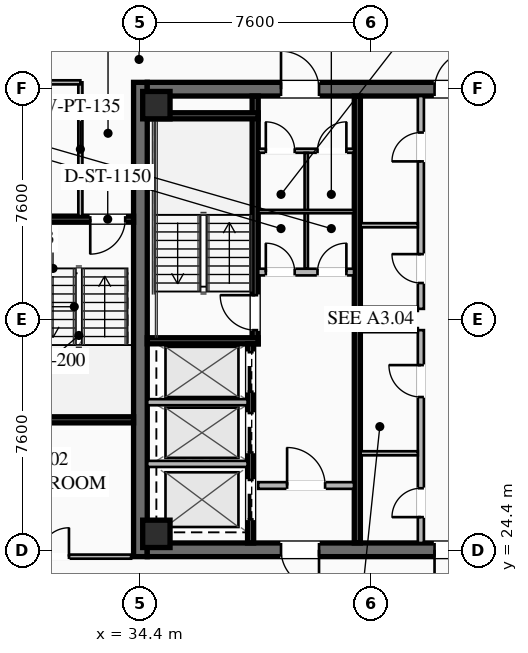
"""IFC4 building model, lengths in metres.
Left out: names, types, materials, properties, quantities, classifications, styles, units other than length and angle.
Written with IfcOpenShell. Run it as: python <this file> out.ifc"""

import sys

from ifc_helpers import new_model, si_unit, direction, frame, frame_2d, origin, origin_2d, place, context, subcontext, project, spatial, rectangle, hollow_rectangle, extrude, element, fill, save


model = new_model("IFC4")
c1 = context("Model", 3, precision=1e-05, world=origin(), true_north=direction((0.0, 1.0)))
c2 = subcontext(c1, "Body", "Model", "MODEL_VIEW")
j1 = project(units=[si_unit("LENGTHUNIT", "METRE"), si_unit("PLANEANGLEUNIT", "RADIAN")], contexts=[c1])
p1 = place(None, origin())
s1 = spatial("IfcSite", under=j1, at=p1, CompositionType="ELEMENT")
p2 = place(p1, origin())
s2 = spatial("IfcBuilding", under=s1, at=p2, CompositionType="ELEMENT")
p3 = place(p2, frame((0.0, 0.0, 204.2)))
s3 = spatial("IfcBuildingStorey", under=s2, at=p3, CompositionType="ELEMENT", Elevation=204.2)
p4 = place(p3, frame((34.425, 24.2, 0.0), z_axis=(0.0, 0.0, 1.0), x_axis=(0.0, 1.0, 0.0)))
e1 = element("IfcWall", 1, at=p4, inside=s3, PredefinedType="SHEAR", context=c2, shape_type="SweptSolid", body=[
    extrude(rectangle(XDim=15.6, YDim=0.45, at=frame_2d((7.8, 0.0))), origin(), (0.0, 0.0, 1.0), 3.55),
])
p5 = place(p3, frame((49.35, 24.425, 0.0), z_axis=(0.0, 0.0, 1.0), x_axis=(-1.0, 0.0, 0.0)))
e2 = element("IfcWall", 2, at=p5, inside=s3, PredefinedType="SHEAR", context=c2, shape_type="SweptSolid", body=[
    extrude(rectangle(XDim=14.7, YDim=0.45, at=frame_2d((7.35, 0.0))), origin(), (0.0, 0.0, 1.0), 3.55),
])
p6 = place(p5, frame((9.05, 0.0, 0.0)))
e3 = element("IfcOpeningElement", 3, at=p6, cuts=e2, PredefinedType="OPENING", context=c2, shape_type="SweptSolid", body=[
    extrude(rectangle(XDim=1.25, YDim=2.25, at=frame_2d((0.625, 1.125))), frame((0.0, 0.235, 0.0), z_axis=(0.0, -1.0, 0.0), x_axis=(1.0, 0.0, 0.0)), (0.0, 0.0, 1.0), 0.47),
])
p7 = place(p5, frame((4.0, 0.0, 0.0)))
e4 = element("IfcOpeningElement", 4, at=p7, cuts=e2, PredefinedType="OPENING", context=c2, shape_type="SweptSolid", body=[
    extrude(rectangle(XDim=1.25, YDim=2.25, at=frame_2d((0.625, 1.125))), frame((0.0, 0.235, 0.0), z_axis=(0.0, -1.0, 0.0), x_axis=(1.0, 0.0, 0.0)), (0.0, 0.0, 1.0), 0.47),
])
p8 = place(p3, frame((34.65, 39.575, 0.0), z_axis=(0.0, 0.0, 1.0), x_axis=(1.0, 0.0, 0.0)))
e5 = element("IfcWall", 5, at=p8, inside=s3, PredefinedType="SHEAR", context=c2, shape_type="SweptSolid", body=[
    extrude(rectangle(XDim=14.7, YDim=0.45, at=frame_2d((7.35, 0.0))), origin(), (0.0, 0.0, 1.0), 3.55),
])
p9 = place(p8, frame((4.4, 0.0, 0.0)))
e6 = element("IfcOpeningElement", 6, at=p9, cuts=e5, PredefinedType="OPENING", context=c2, shape_type="SweptSolid", body=[
    extrude(rectangle(XDim=1.25, YDim=2.25, at=frame_2d((0.625, 1.125))), frame((0.0, 0.235, 0.0), z_axis=(0.0, -1.0, 0.0), x_axis=(1.0, 0.0, 0.0)), (0.0, 0.0, 1.0), 0.47),
])
p10 = place(p8, frame((9.45, 0.0, 0.0)))
e7 = element("IfcOpeningElement", 7, at=p10, cuts=e5, PredefinedType="OPENING", context=c2, shape_type="SweptSolid", body=[
    extrude(rectangle(XDim=1.25, YDim=2.25, at=frame_2d((0.625, 1.125))), frame((0.0, 0.235, 0.0), z_axis=(0.0, -1.0, 0.0), x_axis=(1.0, 0.0, 0.0)), (0.0, 0.0, 1.0), 0.47),
])
for number, where, z_axis, x_axis in (
    (8, (34.95, 24.95, 0.0), (0.0, 0.0, 1.0), (1.0, 0.0, 0.0)),
    (9, (34.95, 39.05, 0.0), (0.0, 0.0, 1.0), (1.0, 0.0, 0.0)),
):
    element("IfcColumn", number, at=place(p3, frame(where, z_axis=z_axis, x_axis=x_axis)), inside=s3, PredefinedType="COLUMN", context=c2, shape_type="SweptSolid", body=[
        extrude(hollow_rectangle(XDim=0.9, YDim=0.9, WallThickness=0.04, at=origin_2d()), origin(), (0.0, 0.0, 1.0), 3.37),
    ])
p11 = place(p3, frame((38.2, 31.2, 0.0), z_axis=(0.0, 0.0, 1.0), x_axis=(0.0, 1.0, 0.0)))
e10 = element("IfcWall", 10, at=p11, inside=s3, PredefinedType="SHEAR", context=c2, shape_type="SweptSolid", body=[
    extrude(rectangle(XDim=8.15, YDim=0.2, at=frame_2d((4.075, 0.0))), origin(), (0.0, 0.0, 1.0), 3.37),
])
p12 = place(p11, frame((0.45, 0.0, 0.0)))
e11 = element("IfcOpeningElement", 11, at=p12, cuts=e10, PredefinedType="OPENING", context=c2, shape_type="SweptSolid", body=[
    extrude(rectangle(XDim=1.15, YDim=2.2, at=frame_2d((0.575, 1.1))), frame((0.0, 0.11, 0.0), z_axis=(0.0, -1.0, 0.0), x_axis=(1.0, 0.0, 0.0)), (0.0, 0.0, 1.0), 0.22),
])
for number, where, z_axis, x_axis in (
    (12, (34.65, 31.3, 0.0), (0.0, 0.0, 1.0), (1.0, 0.0, 0.0)),
    (13, (34.65, 38.7, 0.0), (0.0, 0.0, 1.0), (1.0, 0.0, 0.0)),
):
    element("IfcWall", number, at=place(p3, frame(where, z_axis=z_axis, x_axis=x_axis)), inside=s3, PredefinedType="SHEAR", context=c2, shape_type="SweptSolid", body=[
        extrude(rectangle(XDim=3.65, YDim=0.2, at=frame_2d((1.825, 0.0))), origin(), (0.0, 0.0, 1.0), 3.37),
    ])
p13 = place(p3, frame((41.56, 24.65, 0.0), z_axis=(0.0, 0.0, 1.0), x_axis=(0.0, 1.0, 0.0)))
e14 = element("IfcWall", 14, at=p13, inside=s3, PredefinedType="SHEAR", context=c2, shape_type="SweptSolid", body=[
    extrude(rectangle(XDim=14.7, YDim=0.2, at=frame_2d((7.35, 0.0))), origin(), (0.0, 0.0, 1.0), 3.37),
])
p14 = place(p3, frame((38.3, 33.56, 0.0), z_axis=(0.0, 0.0, 1.0), x_axis=(1.0, 0.0, 0.0)))
e15 = element("IfcWall", 15, at=p14, inside=s3, PredefinedType="SOLIDWALL", context=c2, shape_type="SweptSolid", body=[
    extrude(rectangle(XDim=3.15, YDim=0.22, at=frame_2d((1.575, 0.0))), origin(), (0.0, 0.0, 1.0), 2.723),
])
p15 = place(p14, frame((0.25, 0.0, 0.0)))
e16 = element("IfcOpeningElement", 16, at=p15, cuts=e15, PredefinedType="OPENING", context=c2, shape_type="SweptSolid", body=[
    extrude(rectangle(XDim=0.95, YDim=2.05, at=frame_2d((0.475, 1.025))), frame((0.0, 0.12, 0.0), z_axis=(0.0, -1.0, 0.0), x_axis=(1.0, 0.0, 0.0)), (0.0, 0.0, 1.0), 0.24),
])
p16 = place(p14, frame((1.95, 0.0, 0.0)))
e17 = element("IfcOpeningElement", 17, at=p16, cuts=e15, PredefinedType="OPENING", context=c2, shape_type="SweptSolid", body=[
    extrude(rectangle(XDim=0.95, YDim=2.05, at=frame_2d((0.475, 1.025))), frame((0.0, 0.12, 0.0), z_axis=(0.0, -1.0, 0.0), x_axis=(1.0, 0.0, 0.0)), (0.0, 0.0, 1.0), 0.24),
])
p17 = place(p3, frame((38.3, 26.54, 0.0), z_axis=(0.0, 0.0, 1.0), x_axis=(1.0, 0.0, 0.0)))
e18 = element("IfcWall", 18, at=p17, inside=s3, PredefinedType="SOLIDWALL", context=c2, shape_type="SweptSolid", body=[
    extrude(rectangle(XDim=3.15, YDim=0.22, at=frame_2d((1.575, 0.0))), origin(), (0.0, 0.0, 1.0), 2.723),
])
p18 = place(p17, frame((0.95, 0.0, 0.0)))
e19 = element("IfcOpeningElement", 19, at=p18, cuts=e18, PredefinedType="OPENING", context=c2, shape_type="SweptSolid", body=[
    extrude(rectangle(XDim=1.25, YDim=2.25, at=frame_2d((0.625, 1.125))), frame((0.0, 0.12, 0.0), z_axis=(0.0, -1.0, 0.0), x_axis=(1.0, 0.0, 0.0)), (0.0, 0.0, 1.0), 0.24),
])
p19 = place(p3, frame((38.05, 24.65, 0.0), z_axis=(0.0, 0.0, 1.0), x_axis=(0.0, 1.0, 0.0)))
e20 = element("IfcWall", 20, at=p19, inside=s3, PredefinedType="SHEAR", context=c2, shape_type="SweptSolid", body=[
    extrude(rectangle(XDim=6.55, YDim=0.2, at=frame_2d((3.275, 0.0))), origin(), (0.0, 0.0, 1.0), 3.37),
])
p20 = place(p19, frame((4.975, 0.0, 0.0)))
e21 = element("IfcOpeningElement", 21, at=p20, cuts=e20, PredefinedType="OPENING", context=c2, shape_type="SweptSolid", body=[
    extrude(rectangle(XDim=1.3, YDim=2.25, at=frame_2d((0.65, 1.125))), frame((0.0, 0.11, 0.0), z_axis=(0.0, -1.0, 0.0), x_axis=(1.0, 0.0, 0.0)), (0.0, 0.0, 1.0), 0.22),
])
p21 = place(p19, frame((2.975, 0.0, 0.0)))
e22 = element("IfcOpeningElement", 22, at=p21, cuts=e20, PredefinedType="OPENING", context=c2, shape_type="SweptSolid", body=[
    extrude(rectangle(XDim=1.3, YDim=2.25, at=frame_2d((0.65, 1.125))), frame((0.0, 0.11, 0.0), z_axis=(0.0, -1.0, 0.0), x_axis=(1.0, 0.0, 0.0)), (0.0, 0.0, 1.0), 0.22),
])
p22 = place(p19, frame((0.775, 0.0, 0.0)))
e23 = element("IfcOpeningElement", 23, at=p22, cuts=e20, PredefinedType="OPENING", context=c2, shape_type="SweptSolid", body=[
    extrude(rectangle(XDim=1.3, YDim=2.25, at=frame_2d((0.65, 1.125))), frame((0.0, 0.11, 0.0), z_axis=(0.0, -1.0, 0.0), x_axis=(1.0, 0.0, 0.0)), (0.0, 0.0, 1.0), 0.22),
])
for number, where, z_axis, x_axis in (
    (24, (34.65, 27.25, 0.0), (0.0, 0.0, 1.0), (1.0, 0.0, 0.0)),
    (25, (34.65, 29.28, 0.0), (0.0, 0.0, 1.0), (1.0, 0.0, 0.0)),
):
    element("IfcWall", number, at=place(p3, frame(where, z_axis=z_axis, x_axis=x_axis)), inside=s3, PredefinedType="SOLIDWALL", context=c2, shape_type="SweptSolid", body=[
        extrude(rectangle(XDim=3.3, YDim=0.2, at=frame_2d((1.65, 0.0))), origin(), (0.0, 0.0, 1.0), 3.37),
    ])
p23 = place(p3, frame((38.3, 37.55, 0.0), z_axis=(0.0, 0.0, 1.0), x_axis=(1.0, 0.0, 0.0)))
e26 = element("IfcWall", 26, at=p23, inside=s3, PredefinedType="PARTITIONING", context=c2, shape_type="SweptSolid", body=[
    extrude(rectangle(XDim=3.15, YDim=0.135, at=frame_2d((1.575, 0.0))), origin(), (0.0, 0.0, 1.0), 2.723),
])
p24 = place(p23, frame((0.25, 0.0, 0.0)))
e27 = element("IfcOpeningElement", 27, at=p24, cuts=e26, PredefinedType="OPENING", context=c2, shape_type="SweptSolid", body=[
    extrude(rectangle(XDim=0.95, YDim=2.05, at=frame_2d((0.475, 1.025))), frame((0.0, 0.077, 0.0), z_axis=(0.0, -1.0, 0.0), x_axis=(1.0, 0.0, 0.0)), (0.0, 0.0, 1.0), 0.155),
])
p25 = place(p23, frame((1.95, 0.0, 0.0)))
e28 = element("IfcOpeningElement", 28, at=p25, cuts=e26, PredefinedType="OPENING", context=c2, shape_type="SweptSolid", body=[
    extrude(rectangle(XDim=0.95, YDim=2.05, at=frame_2d((0.475, 1.025))), frame((0.0, 0.077, 0.0), z_axis=(0.0, -1.0, 0.0), x_axis=(1.0, 0.0, 0.0)), (0.0, 0.0, 1.0), 0.155),
])
p26 = place(p3, frame((39.88, 33.68, 0.0), z_axis=(0.0, 0.0, 1.0), x_axis=(0.0, 1.0, 0.0)))
e29 = element("IfcWall", 29, at=p26, inside=s3, PredefinedType="PARTITIONING", context=c2, shape_type="SweptSolid", body=[
    extrude(rectangle(XDim=3.8, YDim=0.11, at=frame_2d((1.9, 0.0))), origin(), (0.0, 0.0, 1.0), 2.723),
])
p27 = place(p3, frame((38.3, 35.55, 0.0), z_axis=(0.0, 0.0, 1.0), x_axis=(1.0, 0.0, 0.0)))
e30 = element("IfcWall", 30, at=p27, inside=s3, PredefinedType="PARTITIONING", context=c2, shape_type="SweptSolid", body=[
    extrude(rectangle(XDim=3.15, YDim=0.11, at=frame_2d((1.575, 0.0))), origin(), (0.0, 0.0, 1.0), 2.723),
])
p28 = place(p3, frame((43.65, 24.65, 0.0), z_axis=(0.0, 0.0, 1.0), x_axis=(0.0, 1.0, 0.0)))
e31 = element("IfcWall", 31, at=p28, inside=s3, PredefinedType="SOLIDWALL", context=c2, shape_type="SweptSolid", body=[
    extrude(rectangle(XDim=7.0, YDim=0.2, at=frame_2d((3.5, 0.0))), origin(), (0.0, 0.0, 1.0), 2.723),
])
p29 = place(p28, frame((0.85, 0.0, 0.0)))
e32 = element("IfcOpeningElement", 32, at=p29, cuts=e31, PredefinedType="OPENING", context=c2, shape_type="SweptSolid", body=[
    extrude(rectangle(XDim=0.95, YDim=2.05, at=frame_2d((0.475, 1.025))), frame((0.0, 0.11, 0.0), z_axis=(0.0, -1.0, 0.0), x_axis=(1.0, 0.0, 0.0)), (0.0, 0.0, 1.0), 0.22),
])
p30 = place(p28, frame((4.8, 0.0, 0.0)))
e33 = element("IfcOpeningElement", 33, at=p30, cuts=e31, PredefinedType="OPENING", context=c2, shape_type="SweptSolid", body=[
    extrude(rectangle(XDim=1.05, YDim=2.2, at=frame_2d((0.525, 1.1))), frame((0.0, 0.11, 0.0), z_axis=(0.0, -1.0, 0.0), x_axis=(1.0, 0.0, 0.0)), (0.0, 0.0, 1.0), 0.22),
])
for number, where, z_axis, x_axis in (
    (34, (41.67, 31.65, 0.0), (0.0, 0.0, 1.0), (1.0, 0.0, 0.0)),
    (35, (41.67, 27.6, 0.0), (0.0, 0.0, 1.0), (1.0, 0.0, 0.0)),
):
    element("IfcWall", number, at=place(p3, frame(where, z_axis=z_axis, x_axis=x_axis)), inside=s3, PredefinedType="PARTITIONING", context=c2, shape_type="SweptSolid", body=[
        extrude(rectangle(XDim=1.88, YDim=0.135, at=frame_2d((0.94, 0.0))), origin(), (0.0, 0.0, 1.0), 2.723),
    ])
p31 = place(p3, frame((43.65, 32.35, 0.0), z_axis=(0.0, 0.0, 1.0), x_axis=(0.0, 1.0, 0.0)))
e36 = element("IfcWall", 36, at=p31, inside=s3, PredefinedType="SOLIDWALL", context=c2, shape_type="SweptSolid", body=[
    extrude(rectangle(XDim=7.0, YDim=0.2, at=frame_2d((3.5, 0.0))), origin(), (0.0, 0.0, 1.0), 2.723),
])
p32 = place(p31, frame((0.85, 0.0, 0.0)))
e37 = element("IfcOpeningElement", 37, at=p32, cuts=e36, PredefinedType="OPENING", context=c2, shape_type="SweptSolid", body=[
    extrude(rectangle(XDim=0.95, YDim=2.05, at=frame_2d((0.475, 1.025))), frame((0.0, 0.11, 0.0), z_axis=(0.0, -1.0, 0.0), x_axis=(1.0, 0.0, 0.0)), (0.0, 0.0, 1.0), 0.22),
])
p33 = place(p31, frame((4.85, 0.0, 0.0)))
e38 = element("IfcOpeningElement", 38, at=p33, cuts=e36, PredefinedType="OPENING", context=c2, shape_type="SweptSolid", body=[
    extrude(rectangle(XDim=0.95, YDim=2.05, at=frame_2d((0.475, 1.025))), frame((0.0, 0.11, 0.0), z_axis=(0.0, -1.0, 0.0), x_axis=(1.0, 0.0, 0.0)), (0.0, 0.0, 1.0), 0.22),
])
for number, where, z_axis, x_axis in (
    (39, (41.67, 32.35, 0.0), (0.0, 0.0, 1.0), (1.0, 0.0, 0.0)),
    (40, (41.67, 35.1, 0.0), (0.0, 0.0, 1.0), (1.0, 0.0, 0.0)),
):
    element("IfcWall", number, at=place(p3, frame(where, z_axis=z_axis, x_axis=x_axis)), inside=s3, PredefinedType="PARTITIONING", context=c2, shape_type="SweptSolid", body=[
        extrude(rectangle(XDim=1.88, YDim=0.135, at=frame_2d((0.94, 0.0))), origin(), (0.0, 0.0, 1.0), 2.723),
    ])
p34 = place(p3, frame((34.2, 35.3, 0.0), z_axis=(0.0, 0.0, 1.0), x_axis=(-1.0, 0.0, 0.0)))
e41 = element("IfcWall", 41, at=p34, inside=s3, PredefinedType="SHEAR", context=c2, shape_type="SweptSolid", body=[
    extrude(rectangle(XDim=3.4, YDim=0.2, at=frame_2d((1.7, 0.0))), origin(), (0.0, 0.0, 1.0), 3.37),
])
p35 = place(p34, frame((0.275, 0.0, 0.0)))
e42 = element("IfcOpeningElement", 42, at=p35, cuts=e41, PredefinedType="OPENING", context=c2, shape_type="SweptSolid", body=[
    extrude(rectangle(XDim=1.15, YDim=2.2, at=frame_2d((0.575, 1.1))), frame((0.0, 0.11, 0.0), z_axis=(0.0, -1.0, 0.0), x_axis=(1.0, 0.0, 0.0)), (0.0, 0.0, 1.0), 0.22),
])
p36 = place(p3, frame((30.8, 28.7, 0.0), z_axis=(0.0, 0.0, 1.0), x_axis=(1.0, 0.0, 0.0)))
e43 = element("IfcWall", 43, at=p36, inside=s3, PredefinedType="SHEAR", context=c2, shape_type="SweptSolid", body=[
    extrude(rectangle(XDim=3.4, YDim=0.2, at=frame_2d((1.7, 0.0))), origin(), (0.0, 0.0, 1.0), 3.37),
])
p37 = place(p3, frame((32.45, 35.4, 0.0), z_axis=(0.0, 0.0, 1.0), x_axis=(0.0, 1.0, 0.0)))
e44 = element("IfcWall", 44, at=p37, inside=s3, PredefinedType="PARTITIONING", context=c2, shape_type="SweptSolid", body=[
    extrude(rectangle(XDim=4.4, YDim=0.135, at=frame_2d((2.2, 0.0))), origin(), (0.0, 0.0, 1.0), 2.723),
])
p38 = place(p3, frame((32.45, 39.8, 0.0), z_axis=(0.0, 0.0, 1.0), x_axis=(-1.0, 0.0, 0.0)))
e45 = element("IfcWall", 45, at=p38, inside=s3, PredefinedType="PARTITIONING", context=c2, shape_type="SweptSolid", body=[
    extrude(rectangle(XDim=6.73, YDim=0.135, at=frame_2d((3.365, 0.0))), origin(), (0.0, 0.0, 1.0), 2.723),
])
p39 = place(p38, frame((2.54, 0.0, 0.0)))
e46 = element("IfcOpeningElement", 46, at=p39, cuts=e45, PredefinedType="OPENING", context=c2, shape_type="SweptSolid", body=[
    extrude(rectangle(XDim=0.95, YDim=2.05, at=frame_2d((0.475, 1.025))), frame((0.0, 0.077, 0.0), z_axis=(0.0, -1.0, 0.0), x_axis=(1.0, 0.0, 0.0)), (0.0, 0.0, 1.0), 0.155),
])
p40 = place(p3, frame((25.72, 24.2, 0.0), z_axis=(0.0, 0.0, 1.0), x_axis=(1.0, 0.0, 0.0)))
e47 = element("IfcWall", 47, at=p40, inside=s3, PredefinedType="PARTITIONING", context=c2, shape_type="SweptSolid", body=[
    extrude(rectangle(XDim=8.4, YDim=0.135, at=frame_2d((4.2, 0.0))), origin(), (0.0, 0.0, 1.0), 2.723),
])
p41 = place(p40, frame((5.405, 0.0, 0.0)))
e48 = element("IfcOpeningElement", 48, at=p41, cuts=e47, PredefinedType="OPENING", context=c2, shape_type="SweptSolid", body=[
    extrude(rectangle(XDim=0.95, YDim=2.05, at=frame_2d((0.475, 1.025))), frame((0.0, 0.077, 0.0), z_axis=(0.0, -1.0, 0.0), x_axis=(1.0, 0.0, 0.0)), (0.0, 0.0, 1.0), 0.155),
])
p42 = place(p9, origin())
e49 = element("IfcDoor", 49, at=p42, inside=s3, OperationType="SINGLE_SWING_LEFT", PredefinedType="DOOR", context=c2, shape_type="SweptSolid", body=[
    extrude(rectangle(XDim=1.25, YDim=2.25, at=frame_2d((0.625, 1.125))), frame((0.0, 0.025, 0.0), z_axis=(0.0, -1.0, 0.0), x_axis=(1.0, 0.0, 0.0)), (0.0, 0.0, 1.0), 0.05),
])
fill(e6, e49)
p43 = place(p10, origin())
e50 = element("IfcDoor", 50, at=p43, inside=s3, OperationType="SINGLE_SWING_RIGHT", PredefinedType="DOOR", context=c2, shape_type="SweptSolid", body=[
    extrude(rectangle(XDim=1.25, YDim=2.25, at=frame_2d((0.625, 1.125))), frame((0.0, 0.025, 0.0), z_axis=(0.0, -1.0, 0.0), x_axis=(1.0, 0.0, 0.0)), (0.0, 0.0, 1.0), 0.05),
])
fill(e7, e50)
p44 = place(p6, origin())
e51 = element("IfcDoor", 51, at=p44, inside=s3, OperationType="SINGLE_SWING_LEFT", PredefinedType="DOOR", context=c2, shape_type="SweptSolid", body=[
    extrude(rectangle(XDim=1.25, YDim=2.25, at=frame_2d((0.625, 1.125))), frame((0.0, 0.025, 0.0), z_axis=(0.0, -1.0, 0.0), x_axis=(1.0, 0.0, 0.0)), (0.0, 0.0, 1.0), 0.05),
])
fill(e3, e51)
p45 = place(p7, origin())
e52 = element("IfcDoor", 52, at=p45, inside=s3, OperationType="SINGLE_SWING_RIGHT", PredefinedType="DOOR", context=c2, shape_type="SweptSolid", body=[
    extrude(rectangle(XDim=1.25, YDim=2.25, at=frame_2d((0.625, 1.125))), frame((0.0, 0.025, 0.0), z_axis=(0.0, -1.0, 0.0), x_axis=(1.0, 0.0, 0.0)), (0.0, 0.0, 1.0), 0.05),
])
fill(e4, e52)
p46 = place(p12, origin())
e53 = element("IfcDoor", 53, at=p46, inside=s3, OperationType="SINGLE_SWING_RIGHT", PredefinedType="DOOR", context=c2, shape_type="SweptSolid", body=[
    extrude(rectangle(XDim=1.15, YDim=2.2, at=frame_2d((0.575, 1.1))), frame((0.0, 0.025, 0.0), z_axis=(0.0, -1.0, 0.0), x_axis=(1.0, 0.0, 0.0)), (0.0, 0.0, 1.0), 0.05),
])
fill(e11, e53)
p47 = place(p18, origin())
e54 = element("IfcDoor", 54, at=p47, inside=s3, OperationType="SINGLE_SWING_LEFT", PredefinedType="DOOR", context=c2, shape_type="SweptSolid", body=[
    extrude(rectangle(XDim=1.25, YDim=2.25, at=frame_2d((0.625, 1.125))), frame((0.0, 0.025, 0.0), z_axis=(0.0, -1.0, 0.0), x_axis=(1.0, 0.0, 0.0)), (0.0, 0.0, 1.0), 0.05),
])
fill(e19, e54)
p48 = place(p24, origin())
e55 = element("IfcDoor", 55, at=p48, inside=s3, OperationType="SINGLE_SWING_LEFT", PredefinedType="DOOR", context=c2, shape_type="SweptSolid", body=[
    extrude(rectangle(XDim=0.95, YDim=2.05, at=frame_2d((0.475, 1.025))), frame((0.0, 0.025, 0.0), z_axis=(0.0, -1.0, 0.0), x_axis=(1.0, 0.0, 0.0)), (0.0, 0.0, 1.0), 0.05),
])
fill(e27, e55)
p49 = place(p25, origin())
e56 = element("IfcDoor", 56, at=p49, inside=s3, OperationType="SINGLE_SWING_RIGHT", PredefinedType="DOOR", context=c2, shape_type="SweptSolid", body=[
    extrude(rectangle(XDim=0.95, YDim=2.05, at=frame_2d((0.475, 1.025))), frame((0.0, 0.025, 0.0), z_axis=(0.0, -1.0, 0.0), x_axis=(1.0, 0.0, 0.0)), (0.0, 0.0, 1.0), 0.05),
])
fill(e28, e56)
p50 = place(p15, origin())
e57 = element("IfcDoor", 57, at=p50, inside=s3, OperationType="SINGLE_SWING_LEFT", PredefinedType="DOOR", context=c2, shape_type="SweptSolid", body=[
    extrude(rectangle(XDim=0.95, YDim=2.05, at=frame_2d((0.475, 1.025))), frame((0.0, 0.025, 0.0), z_axis=(0.0, -1.0, 0.0), x_axis=(1.0, 0.0, 0.0)), (0.0, 0.0, 1.0), 0.05),
])
fill(e16, e57)
p51 = place(p16, origin())
e58 = element("IfcDoor", 58, at=p51, inside=s3, OperationType="SINGLE_SWING_RIGHT", PredefinedType="DOOR", context=c2, shape_type="SweptSolid", body=[
    extrude(rectangle(XDim=0.95, YDim=2.05, at=frame_2d((0.475, 1.025))), frame((0.0, 0.025, 0.0), z_axis=(0.0, -1.0, 0.0), x_axis=(1.0, 0.0, 0.0)), (0.0, 0.0, 1.0), 0.05),
])
fill(e17, e58)
p52 = place(p29, origin())
e59 = element("IfcDoor", 59, at=p52, inside=s3, OperationType="SINGLE_SWING_LEFT", PredefinedType="DOOR", context=c2, shape_type="SweptSolid", body=[
    extrude(rectangle(XDim=0.95, YDim=2.05, at=frame_2d((0.475, 1.025))), frame((0.0, 0.025, 0.0), z_axis=(0.0, -1.0, 0.0), x_axis=(1.0, 0.0, 0.0)), (0.0, 0.0, 1.0), 0.05),
])
fill(e32, e59)
p53 = place(p30, origin())
e60 = element("IfcDoor", 60, at=p53, inside=s3, OperationType="SINGLE_SWING_RIGHT", PredefinedType="DOOR", context=c2, shape_type="SweptSolid", body=[
    extrude(rectangle(XDim=1.05, YDim=2.2, at=frame_2d((0.525, 1.1))), frame((0.0, 0.025, 0.0), z_axis=(0.0, -1.0, 0.0), x_axis=(1.0, 0.0, 0.0)), (0.0, 0.0, 1.0), 0.05),
])
fill(e33, e60)
p54 = place(p32, origin())
e61 = element("IfcDoor", 61, at=p54, inside=s3, OperationType="SINGLE_SWING_RIGHT", PredefinedType="DOOR", context=c2, shape_type="SweptSolid", body=[
    extrude(rectangle(XDim=0.95, YDim=2.05, at=frame_2d((0.475, 1.025))), frame((0.0, 0.025, 0.0), z_axis=(0.0, -1.0, 0.0), x_axis=(1.0, 0.0, 0.0)), (0.0, 0.0, 1.0), 0.05),
])
fill(e37, e61)
p55 = place(p33, origin())
e62 = element("IfcDoor", 62, at=p55, inside=s3, OperationType="SINGLE_SWING_LEFT", PredefinedType="DOOR", context=c2, shape_type="SweptSolid", body=[
    extrude(rectangle(XDim=0.95, YDim=2.05, at=frame_2d((0.475, 1.025))), frame((0.0, 0.025, 0.0), z_axis=(0.0, -1.0, 0.0), x_axis=(1.0, 0.0, 0.0)), (0.0, 0.0, 1.0), 0.05),
])
fill(e38, e62)
p56 = place(p35, origin())
e63 = element("IfcDoor", 63, at=p56, inside=s3, OperationType="SINGLE_SWING_RIGHT", PredefinedType="DOOR", context=c2, shape_type="SweptSolid", body=[
    extrude(rectangle(XDim=1.15, YDim=2.2, at=frame_2d((0.575, 1.1))), frame((0.0, 0.025, 0.0), z_axis=(0.0, -1.0, 0.0), x_axis=(1.0, 0.0, 0.0)), (0.0, 0.0, 1.0), 0.05),
])
fill(e42, e63)
p57 = place(p41, origin())
e64 = element("IfcDoor", 64, at=p57, inside=s3, OperationType="SINGLE_SWING_RIGHT", PredefinedType="DOOR", context=c2, shape_type="SweptSolid", body=[
    extrude(rectangle(XDim=0.95, YDim=2.05, at=frame_2d((0.475, 1.025))), frame((0.0, 0.025, 0.0), z_axis=(0.0, -1.0, 0.0), x_axis=(1.0, 0.0, 0.0)), (0.0, 0.0, 1.0), 0.05),
])
fill(e48, e64)
p58 = place(p20, origin())
e65 = element("IfcDoor", 65, at=p58, inside=s3, OperationType="SLIDING_TO_LEFT", PredefinedType="DOOR", context=c2, shape_type="SweptSolid", body=[
    extrude(rectangle(XDim=1.3, YDim=2.25, at=frame_2d((0.65, 1.125))), frame((0.0, 0.025, 0.0), z_axis=(0.0, -1.0, 0.0), x_axis=(1.0, 0.0, 0.0)), (0.0, 0.0, 1.0), 0.05),
])
fill(e21, e65)
p59 = place(p21, origin())
e66 = element("IfcDoor", 66, at=p59, inside=s3, OperationType="SLIDING_TO_LEFT", PredefinedType="DOOR", context=c2, shape_type="SweptSolid", body=[
    extrude(rectangle(XDim=1.3, YDim=2.25, at=frame_2d((0.65, 1.125))), frame((0.0, 0.025, 0.0), z_axis=(0.0, -1.0, 0.0), x_axis=(1.0, 0.0, 0.0)), (0.0, 0.0, 1.0), 0.05),
])
fill(e22, e66)
p60 = place(p22, origin())
e67 = element("IfcDoor", 67, at=p60, inside=s3, OperationType="SLIDING_TO_LEFT", PredefinedType="DOOR", context=c2, shape_type="SweptSolid", body=[
    extrude(rectangle(XDim=1.3, YDim=2.25, at=frame_2d((0.65, 1.125))), frame((0.0, 0.025, 0.0), z_axis=(0.0, -1.0, 0.0), x_axis=(1.0, 0.0, 0.0)), (0.0, 0.0, 1.0), 0.05),
])
fill(e23, e67)
save(model, sys.argv[1])
